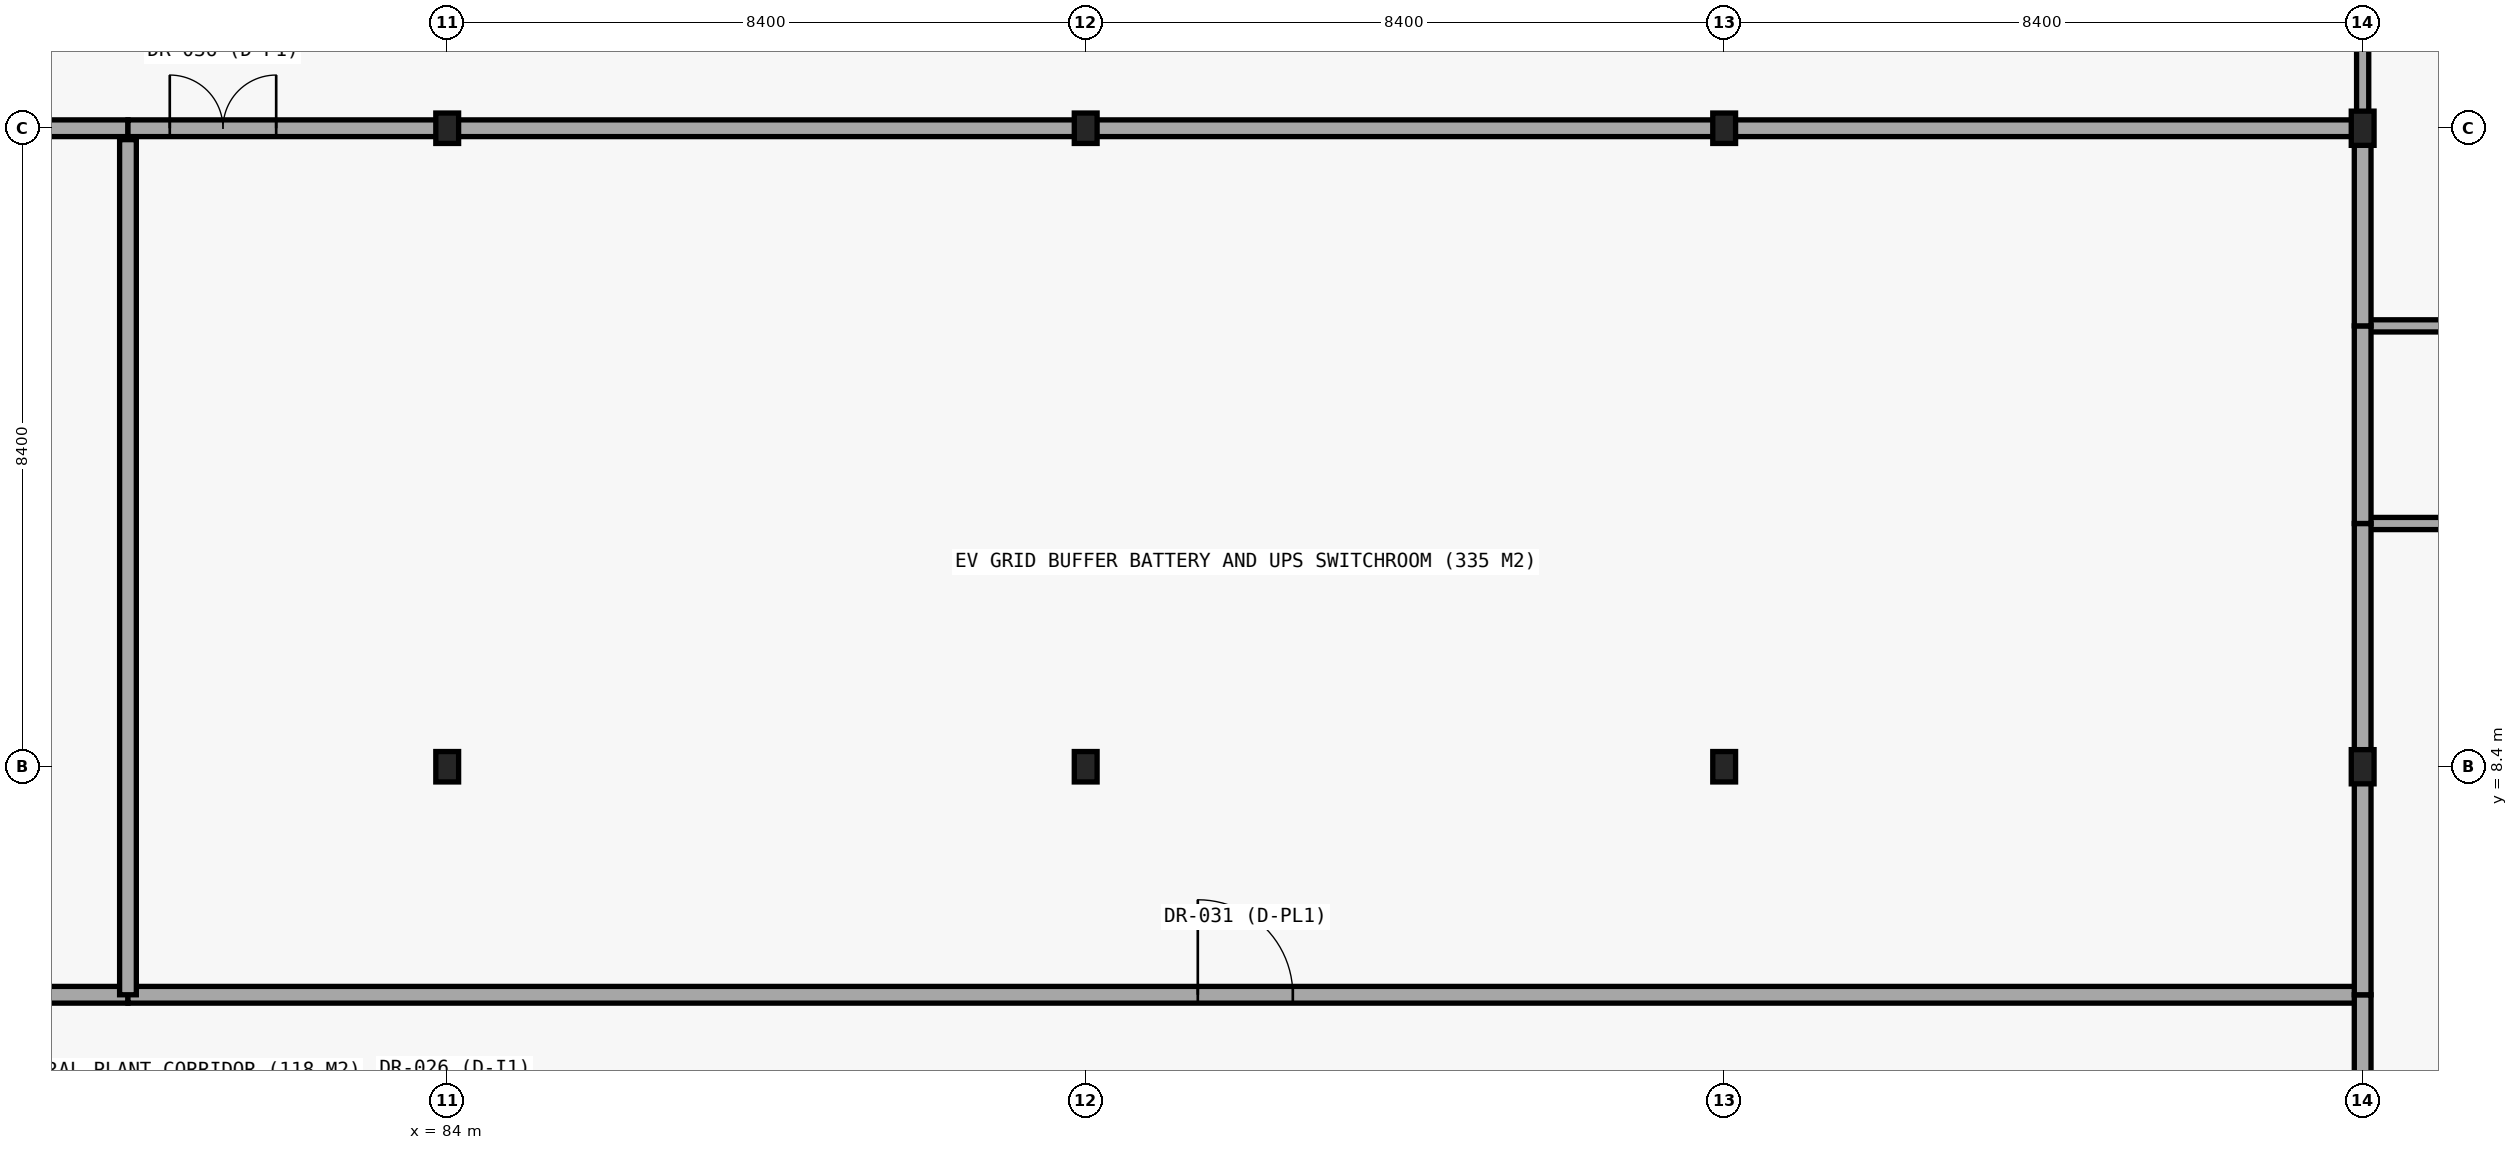
"""IFC4 building model, lengths in metres.
Left out: names, types, materials, properties, quantities, classifications, styles, units other than length and angle.
Written with IfcOpenShell. Run it as: python <this file> out.ifc"""

import sys

from ifc_helpers import new_model, si_unit, direction, frame, frame_2d, origin, origin_2d, place, context, subcontext, project, spatial, rectangle, i_section, extrude, element, fill, save


model = new_model("IFC4")
c1 = context("Model", 3, precision=1e-05, world=origin(), true_north=direction((0.0, 1.0)))
c2 = subcontext(c1, "Body", "Model", "MODEL_VIEW")
j1 = project(units=[si_unit("LENGTHUNIT", "METRE"), si_unit("PLANEANGLEUNIT", "RADIAN")], contexts=[c1])
p1 = place(None, origin())
s1 = spatial("IfcSite", under=j1, at=p1, CompositionType="ELEMENT")
p2 = place(p1, origin())
s2 = spatial("IfcBuilding", under=s1, at=p2, CompositionType="ELEMENT")
p3 = place(p2, frame((0.0, 0.0, -4.5)))
s3 = spatial("IfcBuildingStorey", under=s2, at=p3, CompositionType="ELEMENT", Elevation=-4.5)
for number, where, z_axis, x_axis in (
    (1, (84.0, 8.4, -0.35), (0.0, 0.0, 1.0), (1.0, 0.0, 0.0)),
    (2, (84.0, 16.8, -0.35), (0.0, 0.0, 1.0), (1.0, 0.0, 0.0)),
    (3, (92.4, 8.4, -0.35), (0.0, 0.0, 1.0), (1.0, 0.0, 0.0)),
    (4, (92.4, 16.8, -0.35), (0.0, 0.0, 1.0), (1.0, 0.0, 0.0)),
    (5, (100.8, 8.4, -0.35), (0.0, 0.0, 1.0), (1.0, 0.0, 0.0)),
    (6, (100.8, 16.8, -0.35), (0.0, 0.0, 1.0), (1.0, 0.0, 0.0)),
):
    element("IfcColumn", number, at=place(p3, frame(where, z_axis=z_axis, x_axis=x_axis)), inside=s3, PredefinedType="COLUMN", context=c2, shape_type="SweptSolid", body=[
        extrude(i_section(OverallWidth=0.3, OverallDepth=0.4, WebThickness=0.013, FlangeThickness=0.024, FilletRadius=0.027, at=origin_2d()), origin(), (0.0, 0.0, 1.0), 4.6),
    ])
for number, where, z_axis, x_axis in (
    (7, (109.2, 8.4, -0.35), (0.0, 0.0, 1.0), (1.0, 0.0, 0.0)),
    (8, (109.2, 16.8, -0.35), (0.0, 0.0, 1.0), (1.0, 0.0, 0.0)),
):
    element("IfcColumn", number, at=place(p3, frame(where, z_axis=z_axis, x_axis=x_axis)), inside=s3, PredefinedType="COLUMN", context=c2, shape_type="SweptSolid", body=[
        extrude(i_section(OverallWidth=0.3, OverallDepth=0.45, WebThickness=0.014, FlangeThickness=0.026, FilletRadius=0.027, at=origin_2d()), origin(), (0.0, 0.0, 1.0), 4.85),
    ])
p4 = place(p3, frame((59.0, 5.4, 0.0), z_axis=(0.0, 0.0, 1.0), x_axis=(1.0, 0.0, 0.0)))
e9 = element("IfcWall", 9, at=p4, inside=s3, PredefinedType="PARTITIONING", context=c2, shape_type="SweptSolid", body=[
    extrude(rectangle(XDim=20.8, YDim=0.22, at=frame_2d((10.4, 0.0))), origin(), (0.0, 0.0, 1.0), 3.79),
])
p5 = place(p4, frame((12.42, 0.0, 0.0)))
e10 = element("IfcOpeningElement", 10, at=p5, cuts=e9, PredefinedType="OPENING", context=c2, shape_type="SweptSolid", body=[
    extrude(rectangle(XDim=1.25, YDim=2.2, at=frame_2d((0.625, 1.1))), frame((0.0, 0.12, 0.0), z_axis=(0.0, -1.0, 0.0), x_axis=(1.0, 0.0, 0.0)), (0.0, 0.0, 1.0), 0.24),
])
p6 = place(p3, frame((79.8, 5.4, 0.0), z_axis=(0.0, 0.0, 1.0), x_axis=(1.0, 0.0, 0.0)))
e11 = element("IfcWall", 11, at=p6, inside=s3, PredefinedType="PARTITIONING", context=c2, shape_type="SweptSolid", body=[
    extrude(rectangle(XDim=29.4, YDim=0.22, at=frame_2d((14.7, 0.0))), origin(), (0.0, 0.0, 1.0), 3.79),
])
p7 = place(p6, frame((14.075, 0.0, 0.0)))
e12 = element("IfcOpeningElement", 12, at=p7, cuts=e11, PredefinedType="OPENING", context=c2, shape_type="SweptSolid", body=[
    extrude(rectangle(XDim=1.25, YDim=2.2, at=frame_2d((0.625, 1.1))), frame((0.0, 0.12, 0.0), z_axis=(0.0, -1.0, 0.0), x_axis=(1.0, 0.0, 0.0)), (0.0, 0.0, 1.0), 0.24),
])
p8 = place(p3, frame((109.2, 11.6, 0.0), z_axis=(0.0, 0.0, 1.0), x_axis=(1.0, 0.0, 0.0)))
e13 = element("IfcWall", 13, at=p8, inside=s3, PredefinedType="PARTITIONING", context=c2, shape_type="SweptSolid", body=[
    extrude(rectangle(XDim=16.8, YDim=0.16, at=frame_2d((8.4, 0.0))), origin(), (0.0, 0.0, 1.0), 3.8),
])
p9 = place(p8, frame((7.7, 0.0, 0.0)))
e14 = element("IfcOpeningElement", 14, at=p9, cuts=e13, PredefinedType="OPENING", context=c2, shape_type="SweptSolid", body=[
    extrude(rectangle(XDim=1.4, YDim=2.25, at=frame_2d((0.7, 1.125))), frame((0.0, 0.09, 0.0), z_axis=(0.0, -1.0, 0.0), x_axis=(1.0, 0.0, 0.0)), (0.0, 0.0, 1.0), 0.18),
])
p10 = place(p3, frame((109.2, 14.2, 0.0), z_axis=(0.0, 0.0, 1.0), x_axis=(1.0, 0.0, 0.0)))
e15 = element("IfcWall", 15, at=p10, inside=s3, PredefinedType="PARTITIONING", context=c2, shape_type="SweptSolid", body=[
    extrude(rectangle(XDim=14.2, YDim=0.16, at=frame_2d((7.1, 0.0))), origin(), (0.0, 0.0, 1.0), 3.8),
])
p11 = place(p10, frame((6.4, 0.0, 0.0)))
e16 = element("IfcOpeningElement", 16, at=p11, cuts=e15, PredefinedType="OPENING", context=c2, shape_type="SweptSolid", body=[
    extrude(rectangle(XDim=1.4, YDim=2.25, at=frame_2d((0.7, 1.125))), frame((0.0, 0.09, 0.0), z_axis=(0.0, -1.0, 0.0), x_axis=(1.0, 0.0, 0.0)), (0.0, 0.0, 1.0), 0.18),
])
p12 = place(p3, frame((59.0, 16.8, 0.0), z_axis=(0.0, 0.0, 1.0), x_axis=(1.0, 0.0, 0.0)))
e17 = element("IfcWall", 17, at=p12, inside=s3, PredefinedType="PARTITIONING", context=c2, shape_type="SweptSolid", body=[
    extrude(rectangle(XDim=20.8, YDim=0.22, at=frame_2d((10.4, 0.0))), origin(), (0.0, 0.0, 1.0), 2.77),
])
p13 = place(p3, frame((79.8, 16.8, 0.0), z_axis=(0.0, 0.0, 1.0), x_axis=(1.0, 0.0, 0.0)))
e18 = element("IfcWall", 18, at=p13, inside=s3, PredefinedType="PARTITIONING", context=c2, shape_type="SweptSolid", body=[
    extrude(rectangle(XDim=29.4, YDim=0.22, at=frame_2d((14.7, 0.0))), origin(), (0.0, 0.0, 1.0), 2.77),
])
p14 = place(p13, frame((0.55, 0.0, 0.0)))
e19 = element("IfcOpeningElement", 19, at=p14, cuts=e18, PredefinedType="OPENING", context=c2, shape_type="SweptSolid", body=[
    extrude(rectangle(XDim=1.4, YDim=2.25, at=frame_2d((0.7, 1.125))), frame((0.0, 0.12, 0.0), z_axis=(0.0, -1.0, 0.0), x_axis=(1.0, 0.0, 0.0)), (0.0, 0.0, 1.0), 0.24),
])
p15 = place(p3, frame((79.8, 5.4, 0.0), z_axis=(0.0, 0.0, 1.0), x_axis=(0.0, 1.0, 0.0)))
e20 = element("IfcWall", 20, at=p15, inside=s3, PredefinedType="PARTITIONING", context=c2, shape_type="SweptSolid", body=[
    extrude(rectangle(XDim=11.25, YDim=0.22, at=frame_2d((5.625, 0.0))), origin(), (0.0, 0.0, 1.0), 3.8),
])
p16 = place(p3, frame((109.2, 3.4, 0.0), z_axis=(0.0, 0.0, 1.0), x_axis=(0.0, 1.0, 0.0)))
e21 = element("IfcWall", 21, at=p16, inside=s3, PredefinedType="PARTITIONING", context=c2, shape_type="SweptSolid", body=[
    extrude(rectangle(XDim=2.0, YDim=0.22, at=frame_2d((1.0, 0.0))), origin(), (0.0, 0.0, 1.0), 2.97),
])
p17 = place(p3, frame((109.2, 5.4, 0.0), z_axis=(0.0, 0.0, 1.0), x_axis=(0.0, 1.0, 0.0)))
e22 = element("IfcWall", 22, at=p17, inside=s3, PredefinedType="PARTITIONING", context=c2, shape_type="SweptSolid", body=[
    extrude(rectangle(XDim=6.2, YDim=0.22, at=frame_2d((3.1, 0.0))), origin(), (0.0, 0.0, 1.0), 2.97),
])
p18 = place(p3, frame((109.2, 11.6, 0.0), z_axis=(0.0, 0.0, 1.0), x_axis=(0.0, 1.0, 0.0)))
e23 = element("IfcWall", 23, at=p18, inside=s3, PredefinedType="PARTITIONING", context=c2, shape_type="SweptSolid", body=[
    extrude(rectangle(XDim=2.6, YDim=0.22, at=frame_2d((1.3, 0.0))), origin(), (0.0, 0.0, 1.0), 2.97),
])
p19 = place(p3, frame((109.2, 14.2, 0.0), z_axis=(0.0, 0.0, 1.0), x_axis=(0.0, 1.0, 0.0)))
e24 = element("IfcWall", 24, at=p19, inside=s3, PredefinedType="PARTITIONING", context=c2, shape_type="SweptSolid", body=[
    extrude(rectangle(XDim=2.45, YDim=0.22, at=frame_2d((1.225, 0.0))), origin(), (0.0, 0.0, 1.0), 2.97),
])
p20 = place(p3, frame((109.2, 16.95, 0.0), z_axis=(0.0, 0.0, 1.0), x_axis=(0.0, 1.0, 0.0)))
e25 = element("IfcWall", 25, at=p20, inside=s3, PredefinedType="PARTITIONING", context=c2, shape_type="SweptSolid", body=[
    extrude(rectangle(XDim=16.47, YDim=0.16, at=frame_2d((8.235, 0.0))), origin(), (0.0, 0.0, 1.0), 2.97),
])
p21 = place(p7, origin())
e26 = element("IfcDoor", 26, at=p21, inside=s3, OperationType="SINGLE_SWING_LEFT", PredefinedType="DOOR", context=c2, shape_type="SweptSolid", body=[
    extrude(rectangle(XDim=1.25, YDim=2.2, at=frame_2d((0.625, 1.1))), frame((0.0, 0.025, 0.0), z_axis=(0.0, -1.0, 0.0), x_axis=(1.0, 0.0, 0.0)), (0.0, 0.0, 1.0), 0.05),
])
fill(e12, e26)
p22 = place(p14, origin())
e27 = element("IfcDoor", 27, at=p22, inside=s3, OperationType="DOUBLE_DOOR_SINGLE_SWING", PredefinedType="DOOR", context=c2, shape_type="SweptSolid", body=[
    extrude(rectangle(XDim=1.4, YDim=2.25, at=frame_2d((0.7, 1.125))), frame((0.0, 0.025, 0.0), z_axis=(0.0, -1.0, 0.0), x_axis=(1.0, 0.0, 0.0)), (0.0, 0.0, 1.0), 0.05),
])
fill(e19, e27)
save(model, sys.argv[1])
